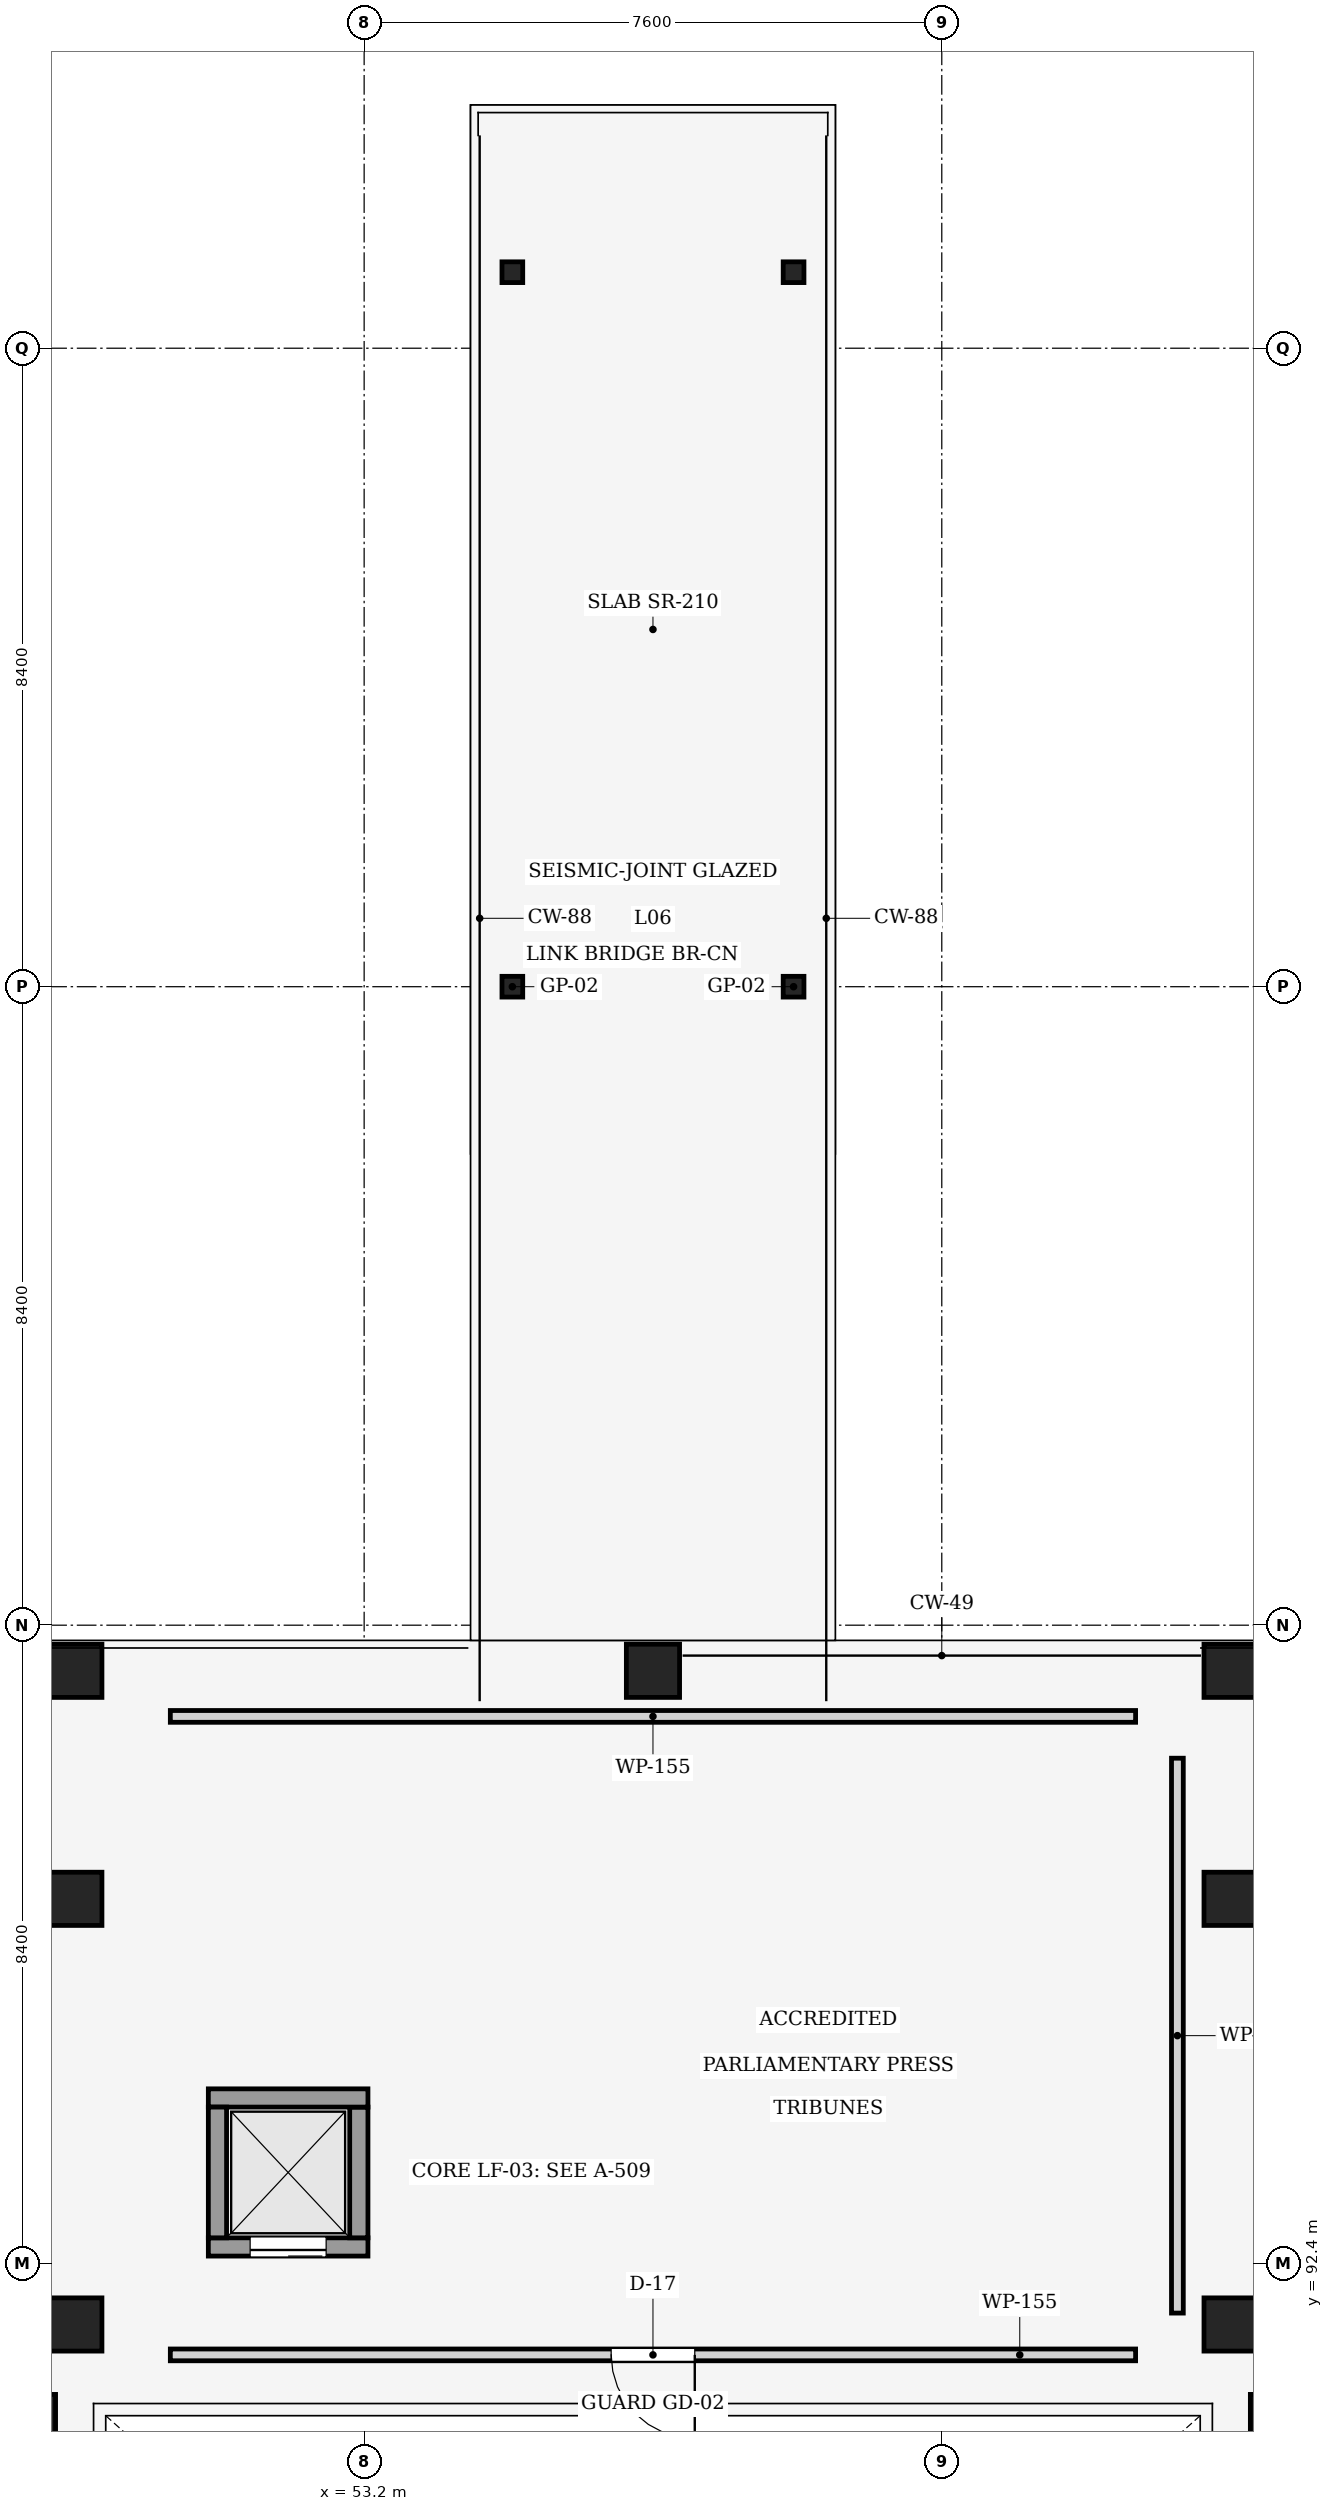
"""IFC4 building model, lengths in metres.
Left out: names, types, materials, properties, quantities, classifications, styles, units other than length and angle.
Written with IfcOpenShell. Run it as: python <this file> out.ifc"""

import sys

from ifc_helpers import new_model, si_unit, direction, frame, frame_2d, origin, origin_2d, place, context, subcontext, project, spatial, rectangle, hollow_circle, extrude, element, fill, save


model = new_model("IFC4")
c1 = context("Model", 3, precision=1e-05, world=origin(), true_north=direction((0.0, 1.0)))
c2 = subcontext(c1, "Body", "Model", "MODEL_VIEW")
j1 = project(units=[si_unit("LENGTHUNIT", "METRE"), si_unit("PLANEANGLEUNIT", "RADIAN")], contexts=[c1])
p1 = place(None, origin())
s1 = spatial("IfcSite", under=j1, at=p1, CompositionType="ELEMENT")
p2 = place(p1, origin())
s2 = spatial("IfcBuilding", under=s1, at=p2, CompositionType="ELEMENT")
p3 = place(p2, frame((0.0, 0.0, 25.35)))
s3 = spatial("IfcBuildingStorey", under=s2, at=p3, CompositionType="ELEMENT", Elevation=25.35)
for number, where, z_axis, x_axis in (
    (1, (49.4, 91.6, 0.0), (0.0, 0.0, 1.0), (1.0, 0.0, 0.0)),
    (2, (49.4, 97.2, 0.0), (0.0, 0.0, 1.0), (1.0, 0.0, 0.0)),
    (3, (64.6, 91.6, 0.0), (0.0, 0.0, 1.0), (1.0, 0.0, 0.0)),
    (4, (64.6, 97.2, 0.0), (0.0, 0.0, 1.0), (1.0, 0.0, 0.0)),
):
    element("IfcColumn", number, at=place(p3, frame(where, z_axis=z_axis, x_axis=x_axis)), inside=s3, PredefinedType="COLUMN", context=c2, shape_type="SweptSolid", body=[
        extrude(rectangle(XDim=0.7, YDim=0.7, at=origin_2d()), origin(), (0.0, 0.0, 1.0), 4.05),
    ])
for number, where, z_axis, x_axis in (
    (5, (49.4, 100.2, 0.0), (0.0, 0.0, 1.0), (1.0, 0.0, 0.0)),
    (6, (57.0, 100.2, 0.0), (0.0, 0.0, 1.0), (1.0, 0.0, 0.0)),
    (7, (64.6, 100.2, 0.0), (0.0, 0.0, 1.0), (1.0, 0.0, 0.0)),
):
    element("IfcColumn", number, at=place(p3, frame(where, z_axis=z_axis, x_axis=x_axis)), inside=s3, PredefinedType="COLUMN", context=c2, shape_type="SweptSolid", body=[
        extrude(rectangle(XDim=0.7, YDim=0.7, at=origin_2d()), origin(), (0.0, 0.0, 1.0), 5.85),
    ])
for number, where, z_axis, x_axis in (
    (8, (55.15, 109.2, 0.0), (0.0, 0.0, 1.0), (1.0, 0.0, 0.0)),
    (9, (58.85, 109.2, 0.0), (0.0, 0.0, 1.0), (1.0, 0.0, 0.0)),
    (10, (58.85, 118.6, 0.0), (0.0, 0.0, 1.0), (1.0, 0.0, 0.0)),
    (11, (55.15, 118.6, 0.0), (0.0, 0.0, 1.0), (1.0, 0.0, 0.0)),
):
    element("IfcColumn", number, at=place(p3, frame(where, z_axis=z_axis, x_axis=x_axis)), inside=s3, PredefinedType="COLUMN", context=c2, shape_type="SweptSolid", body=[
        extrude(hollow_circle(Radius=0.136, WallThickness=0.016, at=origin_2d()), origin(), (0.0, 0.0, 1.0), 3.1),
    ])
for number, where, z_axis, x_axis in (
    (12, (48.84, 90.38, 0.0), (0.0, 0.0, 1.0), (1.0, 0.0, 0.0)),
    (13, (65.16, 90.38, 0.0), (0.0, 0.0, 1.0), (1.0, 0.0, 0.0)),
):
    element("IfcColumn", number, at=place(p3, frame(where, z_axis=z_axis, x_axis=x_axis)), inside=s3, PredefinedType="COLUMN", context=c2, shape_type="SweptSolid", body=[
        extrude(rectangle(XDim=0.6, YDim=0.6, at=origin_2d()), origin(), (0.0, 0.0, 1.0), 4.05),
    ])
p4 = place(p3, frame((53.25, 92.62, 0.0), z_axis=(0.0, 0.0, 1.0), x_axis=(-1.0, 0.0, 0.0)))
e14 = element("IfcWall", 14, at=p4, inside=s3, PredefinedType="SHEAR", context=c2, shape_type="SweptSolid", body=[
    extrude(rectangle(XDim=2.1, YDim=0.24, at=frame_2d((1.05, 0.0))), origin(), (0.0, 0.0, 1.0), 4.05),
])
p5 = place(p4, frame((0.55, 0.0, 0.0)))
e15 = element("IfcOpeningElement", 15, at=p5, cuts=e14, PredefinedType="OPENING", context=c2, shape_type="SweptSolid", body=[
    extrude(rectangle(XDim=1.0, YDim=2.15, at=frame_2d((0.5, 1.075))), frame((0.0, 0.13, 0.0), z_axis=(0.0, -1.0, 0.0), x_axis=(1.0, 0.0, 0.0)), (0.0, 0.0, 1.0), 0.26),
])
p6 = place(p3, frame((53.13, 94.46, 0.0), z_axis=(0.0, 0.0, 1.0), x_axis=(0.0, -1.0, 0.0)))
e16 = element("IfcWall", 16, at=p6, inside=s3, PredefinedType="SHEAR", context=c2, shape_type="SweptSolid", body=[
    extrude(rectangle(XDim=1.72, YDim=0.24, at=frame_2d((0.86, 0.0))), origin(), (0.0, 0.0, 1.0), 4.05),
])
p7 = place(p3, frame((51.15, 94.58, 0.0), z_axis=(0.0, 0.0, 1.0), x_axis=(1.0, 0.0, 0.0)))
e17 = element("IfcWall", 17, at=p7, inside=s3, PredefinedType="SHEAR", context=c2, shape_type="SweptSolid", body=[
    extrude(rectangle(XDim=2.1, YDim=0.24, at=frame_2d((1.05, 0.0))), origin(), (0.0, 0.0, 1.0), 4.05),
])
p8 = place(p3, frame((51.27, 92.74, 0.0), z_axis=(0.0, 0.0, 1.0), x_axis=(0.0, 1.0, 0.0)))
e18 = element("IfcWall", 18, at=p8, inside=s3, PredefinedType="SHEAR", context=c2, shape_type="SweptSolid", body=[
    extrude(rectangle(XDim=1.72, YDim=0.24, at=frame_2d((0.86, 0.0))), origin(), (0.0, 0.0, 1.0), 4.05),
])
p9 = place(p3, frame((63.35, 91.2, 0.0), z_axis=(0.0, 0.0, 1.0), x_axis=(-1.0, 0.0, 0.0)))
e19 = element("IfcWall", 19, at=p9, inside=s3, PredefinedType="PARTITIONING", context=c2, shape_type="SweptSolid", body=[
    extrude(rectangle(XDim=12.7, YDim=0.155, at=frame_2d((6.35, 0.0))), origin(), (0.0, 0.0, 1.0), 3.125),
])
p10 = place(p9, frame((5.8, 0.0, 0.0)))
e20 = element("IfcOpeningElement", 20, at=p10, cuts=e19, PredefinedType="OPENING", context=c2, shape_type="SweptSolid", body=[
    extrude(rectangle(XDim=1.1, YDim=2.35, at=frame_2d((0.55, 1.175))), frame((0.0, 0.087, 0.0), z_axis=(0.0, -1.0, 0.0), x_axis=(1.0, 0.0, 0.0)), (0.0, 0.0, 1.0), 0.175),
])
p11 = place(p3, frame((50.65, 99.6, 0.0), z_axis=(0.0, 0.0, 1.0), x_axis=(1.0, 0.0, 0.0)))
e21 = element("IfcWall", 21, at=p11, inside=s3, PredefinedType="PARTITIONING", context=c2, shape_type="SweptSolid", body=[
    extrude(rectangle(XDim=12.7, YDim=0.155, at=frame_2d((6.35, 0.0))), origin(), (0.0, 0.0, 1.0), 3.71),
])
p12 = place(p3, frame((63.9, 99.05, 0.0), z_axis=(0.0, 0.0, 1.0), x_axis=(0.0, -1.0, 0.0)))
e22 = element("IfcWall", 22, at=p12, inside=s3, PredefinedType="PARTITIONING", context=c2, shape_type="SweptSolid", body=[
    extrude(rectangle(XDim=7.3, YDim=0.155, at=frame_2d((3.65, 0.0))), origin(), (0.0, 0.0, 1.0), 3.125),
])
p13 = place(p5, origin())
e23 = element("IfcDoor", 23, at=p13, inside=s3, OperationType="SLIDING_TO_LEFT", PredefinedType="DOOR", context=c2, shape_type="SweptSolid", body=[
    extrude(rectangle(XDim=1.0, YDim=2.15, at=frame_2d((0.5, 1.075))), frame((0.0, 0.025, 0.0), z_axis=(0.0, -1.0, 0.0), x_axis=(1.0, 0.0, 0.0)), (0.0, 0.0, 1.0), 0.05),
])
fill(e15, e23)
p14 = place(p10, origin())
e24 = element("IfcDoor", 24, at=p14, inside=s3, OperationType="SINGLE_SWING_LEFT", PredefinedType="DOOR", context=c2, shape_type="SweptSolid", body=[
    extrude(rectangle(XDim=1.1, YDim=2.35, at=frame_2d((0.55, 1.175))), frame((0.0, 0.025, 0.0), z_axis=(0.0, -1.0, 0.0), x_axis=(1.0, 0.0, 0.0)), (0.0, 0.0, 1.0), 0.05),
])
fill(e20, e24)
save(model, sys.argv[1])
